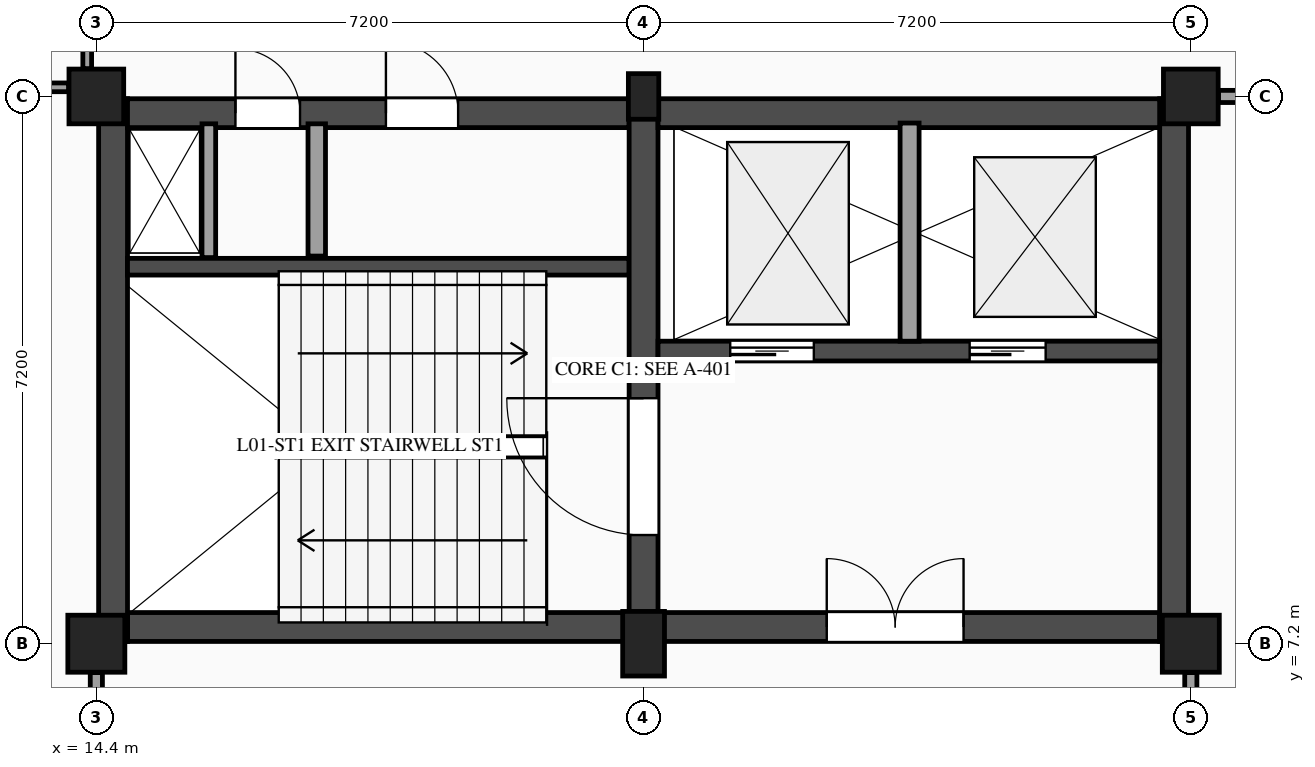
"""IFC4 building model, lengths in metres.
Left out: names, types, materials, properties, quantities, classifications, styles, units other than length and angle.
Written with IfcOpenShell. Run it as: python <this file> out.ifc"""

import sys

from ifc_helpers import new_model, si_unit, direction, frame, frame_2d, origin, origin_2d, place, context, subcontext, project, spatial, rectangle, extrude, element, fill, save


model = new_model("IFC4")
c1 = context("Model", 3, precision=1e-05, world=origin(), true_north=direction((0.0, 1.0)))
c2 = subcontext(c1, "Body", "Model", "MODEL_VIEW")
j1 = project(units=[si_unit("LENGTHUNIT", "METRE"), si_unit("PLANEANGLEUNIT", "RADIAN")], contexts=[c1])
p1 = place(None, origin())
s1 = spatial("IfcSite", under=j1, at=p1, CompositionType="ELEMENT")
p2 = place(p1, origin())
s2 = spatial("IfcBuilding", under=s1, at=p2, CompositionType="ELEMENT")
p3 = place(p2, frame((0.0, 0.0, 5.4)))
s3 = spatial("IfcBuildingStorey", under=s2, at=p3, CompositionType="ELEMENT", Elevation=5.4)
p4 = place(p3, frame((14.4, 7.2, 0.0), z_axis=(0.0, 0.0, 1.0), x_axis=(1.0, 0.0, 0.0)))
e1 = element("IfcColumn", 1, at=p4, inside=s3, PredefinedType="COLUMN", context=c2, shape_type="SweptSolid", body=[
    extrude(rectangle(XDim=0.75, YDim=0.75, at=origin_2d()), origin(), (0.0, 0.0, 1.0), 4.5),
])
p5 = place(p3, frame((14.4, 14.4, 0.0), z_axis=(0.0, 0.0, 1.0), x_axis=(1.0, 0.0, 0.0)))
e2 = element("IfcColumn", 2, at=p5, inside=s3, PredefinedType="COLUMN", context=c2, shape_type="SweptSolid", body=[
    extrude(rectangle(XDim=0.72, YDim=0.72, at=origin_2d()), origin(), (0.0, 0.0, 1.0), 4.5),
])
p6 = place(p3, frame((21.6, 7.2, 0.0), z_axis=(0.0, 0.0, 1.0), x_axis=(1.0, 0.0, 0.0)))
e3 = element("IfcColumn", 3, at=p6, inside=s3, PredefinedType="COLUMN", context=c2, shape_type="SweptSolid", body=[
    extrude(rectangle(XDim=0.55, YDim=0.85, at=origin_2d()), origin(), (0.0, 0.0, 1.0), 4.5),
])
p7 = place(p3, frame((21.6, 14.4, 0.0), z_axis=(0.0, 0.0, 1.0), x_axis=(1.0, 0.0, 0.0)))
e4 = element("IfcColumn", 4, at=p7, inside=s3, PredefinedType="PILASTER", context=c2, shape_type="SweptSolid", body=[
    extrude(rectangle(XDim=0.4, YDim=0.6, at=origin_2d()), origin(), (0.0, 0.0, 1.0), 4.5),
])
p8 = place(p3, frame((28.8, 7.2, 0.0), z_axis=(0.0, 0.0, 1.0), x_axis=(1.0, 0.0, 0.0)))
e5 = element("IfcColumn", 5, at=p8, inside=s3, PredefinedType="COLUMN", context=c2, shape_type="SweptSolid", body=[
    extrude(rectangle(XDim=0.75, YDim=0.75, at=origin_2d()), origin(), (0.0, 0.0, 1.0), 4.5),
])
p9 = place(p3, frame((28.8, 14.4, 0.0), z_axis=(0.0, 0.0, 1.0), x_axis=(1.0, 0.0, 0.0)))
e6 = element("IfcColumn", 6, at=p9, inside=s3, PredefinedType="COLUMN", context=c2, shape_type="SweptSolid", body=[
    extrude(rectangle(XDim=0.72, YDim=0.72, at=origin_2d()), origin(), (0.0, 0.0, 1.0), 4.5),
])
p10 = place(p3, frame((14.81, 7.42, 0.0), z_axis=(0.0, 0.0, 1.0), x_axis=(1.0, 0.0, 0.0)))
e7 = element("IfcWall", 7, at=p10, inside=s3, PredefinedType="SHEAR", context=c2, shape_type="SweptSolid", body=[
    extrude(rectangle(XDim=6.6, YDim=0.38, at=frame_2d((3.3, 0.0))), origin(), (0.0, 0.0, 1.0), 4.21),
])
p11 = place(p3, frame((14.62, 14.37, 0.0), z_axis=(0.0, 0.0, 1.0), x_axis=(0.0, -1.0, 0.0)))
e8 = element("IfcWall", 8, at=p11, inside=s3, PredefinedType="SHEAR", context=c2, shape_type="SweptSolid", body=[
    extrude(rectangle(XDim=7.14, YDim=0.38, at=frame_2d((3.57, 0.0))), origin(), (0.0, 0.0, 1.0), 4.21),
])
p12 = place(p3, frame((14.81, 14.18, 0.0), z_axis=(0.0, 0.0, 1.0), x_axis=(1.0, 0.0, 0.0)))
e9 = element("IfcWall", 9, at=p12, inside=s3, PredefinedType="SHEAR", context=c2, shape_type="SweptSolid", body=[
    extrude(rectangle(XDim=6.6, YDim=0.38, at=frame_2d((3.3, 0.0))), origin(), (0.0, 0.0, 1.0), 4.21),
])
p13 = place(p12, frame((1.42, 0.0, 0.0)))
e10 = element("IfcOpeningElement", 10, at=p13, cuts=e9, PredefinedType="OPENING", context=c2, shape_type="SweptSolid", body=[
    extrude(rectangle(XDim=0.85, YDim=2.1, at=frame_2d((0.425, 1.05))), frame((0.0, 0.2, 0.0), z_axis=(0.0, -1.0, 0.0), x_axis=(1.0, 0.0, 0.0)), (0.0, 0.0, 1.0), 0.4),
])
p14 = place(p12, frame((3.4, 0.0, 0.0)))
e11 = element("IfcOpeningElement", 11, at=p14, cuts=e9, PredefinedType="OPENING", context=c2, shape_type="SweptSolid", body=[
    extrude(rectangle(XDim=0.95, YDim=2.15, at=frame_2d((0.475, 1.075))), frame((0.0, 0.2, 0.0), z_axis=(0.0, -1.0, 0.0), x_axis=(1.0, 0.0, 0.0)), (0.0, 0.0, 1.0), 0.4),
])
p15 = place(p3, frame((14.81, 12.16, 0.0), z_axis=(0.0, 0.0, 1.0), x_axis=(1.0, 0.0, 0.0)))
e12 = element("IfcWall", 12, at=p15, inside=s3, PredefinedType="SHEAR", context=c2, shape_type="SweptSolid", body=[
    extrude(rectangle(XDim=6.6, YDim=0.22, at=frame_2d((3.3, 0.0))), origin(), (0.0, 0.0, 1.0), 4.21),
])
p16 = place(p3, frame((17.3, 12.3, 0.0), z_axis=(0.0, 0.0, 1.0), x_axis=(0.0, 1.0, 0.0)))
e13 = element("IfcWall", 13, at=p16, inside=s3, PredefinedType="PARTITIONING", context=c2, shape_type="SweptSolid", body=[
    extrude(rectangle(XDim=1.74, YDim=0.23, at=frame_2d((0.87, 0.0))), origin(), (0.0, 0.0, 1.0), 4.21),
])
p17 = place(p3, frame((15.88, 12.28, 0.0), z_axis=(0.0, 0.0, 1.0), x_axis=(0.0, 1.0, 0.0)))
e14 = element("IfcWall", 14, at=p17, inside=s3, PredefinedType="PARTITIONING", context=c2, shape_type="SweptSolid", body=[
    extrude(rectangle(XDim=1.76, YDim=0.18, at=frame_2d((0.88, 0.0))), origin(), (0.0, 0.0, 1.0), 4.21),
])
p18 = place(p3, frame((21.6, 7.23, 0.0), z_axis=(0.0, 0.0, 1.0), x_axis=(0.0, 1.0, 0.0)))
e15 = element("IfcWall", 15, at=p18, inside=s3, PredefinedType="SHEAR", context=c2, shape_type="SweptSolid", body=[
    extrude(rectangle(XDim=7.14, YDim=0.38, at=frame_2d((3.57, 0.0))), origin(), (0.0, 0.0, 1.0), 4.21),
])
p19 = place(p18, frame((1.4, 0.0, 0.0)))
e16 = element("IfcOpeningElement", 16, at=p19, cuts=e15, PredefinedType="OPENING", context=c2, shape_type="SweptSolid", body=[
    extrude(rectangle(XDim=1.8, YDim=2.2, at=frame_2d((0.9, 1.1))), frame((0.0, 0.2, 0.0), z_axis=(0.0, -1.0, 0.0), x_axis=(1.0, 0.0, 0.0)), (0.0, 0.0, 1.0), 0.4),
])
p20 = place(p3, frame((21.79, 7.42, 0.0), z_axis=(0.0, 0.0, 1.0), x_axis=(1.0, 0.0, 0.0)))
e17 = element("IfcWall", 17, at=p20, inside=s3, PredefinedType="SHEAR", context=c2, shape_type="SweptSolid", body=[
    extrude(rectangle(XDim=6.6, YDim=0.38, at=frame_2d((3.3, 0.0))), origin(), (0.0, 0.0, 1.0), 4.21),
])
p21 = place(p20, frame((2.22, 0.0, 0.0)))
e18 = element("IfcOpeningElement", 18, at=p21, cuts=e17, PredefinedType="OPENING", context=c2, shape_type="SweptSolid", body=[
    extrude(rectangle(XDim=1.8, YDim=2.2, at=frame_2d((0.9, 1.1))), frame((0.0, 0.2, 0.0), z_axis=(0.0, -1.0, 0.0), x_axis=(1.0, 0.0, 0.0)), (0.0, 0.0, 1.0), 0.4),
])
p22 = place(p3, frame((28.58, 7.23, 0.0), z_axis=(0.0, 0.0, 1.0), x_axis=(0.0, 1.0, 0.0)))
e19 = element("IfcWall", 19, at=p22, inside=s3, PredefinedType="SHEAR", context=c2, shape_type="SweptSolid", body=[
    extrude(rectangle(XDim=7.14, YDim=0.38, at=frame_2d((3.57, 0.0))), origin(), (0.0, 0.0, 1.0), 4.21),
])
p23 = place(p3, frame((21.79, 14.18, 0.0), z_axis=(0.0, 0.0, 1.0), x_axis=(1.0, 0.0, 0.0)))
e20 = element("IfcWall", 20, at=p23, inside=s3, PredefinedType="SHEAR", context=c2, shape_type="SweptSolid", body=[
    extrude(rectangle(XDim=6.6, YDim=0.38, at=frame_2d((3.3, 0.0))), origin(), (0.0, 0.0, 1.0), 4.21),
])
p24 = place(p3, frame((21.79, 11.05, 0.0), z_axis=(0.0, 0.0, 1.0), x_axis=(1.0, 0.0, 0.0)))
e21 = element("IfcWall", 21, at=p24, inside=s3, PredefinedType="SHEAR", context=c2, shape_type="SweptSolid", body=[
    extrude(rectangle(XDim=6.6, YDim=0.26, at=frame_2d((3.3, 0.0))), origin(), (0.0, 0.0, 1.0), 4.21),
])
p25 = place(p24, frame((0.95, 0.0, 0.0)))
e22 = element("IfcOpeningElement", 22, at=p25, cuts=e21, PredefinedType="OPENING", context=c2, shape_type="SweptSolid", body=[
    extrude(rectangle(XDim=1.1, YDim=2.2, at=frame_2d((0.55, 1.1))), frame((0.0, 0.14, 0.0), z_axis=(0.0, -1.0, 0.0), x_axis=(1.0, 0.0, 0.0)), (0.0, 0.0, 1.0), 0.28),
])
p26 = place(p24, frame((4.1, 0.0, 0.0)))
e23 = element("IfcOpeningElement", 23, at=p26, cuts=e21, PredefinedType="OPENING", context=c2, shape_type="SweptSolid", body=[
    extrude(rectangle(XDim=1.0, YDim=2.15, at=frame_2d((0.5, 1.075))), frame((0.0, 0.14, 0.0), z_axis=(0.0, -1.0, 0.0), x_axis=(1.0, 0.0, 0.0)), (0.0, 0.0, 1.0), 0.28),
])
p27 = place(p3, frame((25.1, 11.18, 0.0), z_axis=(0.0, 0.0, 1.0), x_axis=(0.0, 1.0, 0.0)))
e24 = element("IfcWall", 24, at=p27, inside=s3, PredefinedType="PARTITIONING", context=c2, shape_type="SweptSolid", body=[
    extrude(rectangle(XDim=2.87, YDim=0.25, at=frame_2d((1.435, 0.0))), origin(), (0.0, 0.0, 1.0), 4.21),
])
p28 = place(p3, frame((7.405, 14.52, 0.0), z_axis=(0.0, 0.0, 1.0), x_axis=(1.0, 0.0, 0.0)))
e25 = element("IfcWall", 25, at=p28, inside=s3, PredefinedType="PARTITIONING", context=c2, shape_type="SweptSolid", body=[
    extrude(rectangle(XDim=6.63, YDim=0.115, at=frame_2d((3.315, 0.0))), origin(), (0.0, 0.0, 1.0), 3.47),
])
p29 = place(p3, frame((14.28, 14.765, 0.0), z_axis=(0.0, 0.0, 1.0), x_axis=(0.0, 1.0, 0.0)))
e26 = element("IfcWall", 26, at=p29, inside=s3, PredefinedType="PARTITIONING", context=c2, shape_type="SweptSolid", body=[
    extrude(rectangle(XDim=6.48, YDim=0.115, at=frame_2d((3.24, 0.0))), origin(), (0.0, 0.0, 1.0), 3.52),
])
p30 = place(p29, frame((0.635, 0.0, 0.0)))
e27 = element("IfcOpeningElement", 27, at=p30, cuts=e26, PredefinedType="OPENING", context=c2, shape_type="SweptSolid", body=[
    extrude(rectangle(XDim=0.95, YDim=2.1, at=frame_2d((0.475, 1.05))), frame((0.0, 0.067, 0.0), z_axis=(0.0, -1.0, 0.0), x_axis=(1.0, 0.0, 0.0)), (0.0, 0.0, 1.0), 0.135),
])
p31 = place(p29, frame((2.735, 0.0, 0.0)))
e28 = element("IfcOpeningElement", 28, at=p31, cuts=e26, PredefinedType="OPENING", context=c2, shape_type="SweptSolid", body=[
    extrude(rectangle(XDim=0.95, YDim=2.1, at=frame_2d((0.475, 1.05))), frame((0.0, 0.067, 0.0), z_axis=(0.0, -1.0, 0.0), x_axis=(1.0, 0.0, 0.0)), (0.0, 0.0, 1.0), 0.135),
])
p32 = place(p29, frame((4.885, 0.0, 0.0)))
e29 = element("IfcOpeningElement", 29, at=p32, cuts=e26, PredefinedType="OPENING", context=c2, shape_type="SweptSolid", body=[
    extrude(rectangle(XDim=1.0, YDim=2.15, at=frame_2d((0.5, 1.075))), frame((0.0, 0.067, 0.0), z_axis=(0.0, -1.0, 0.0), x_axis=(1.0, 0.0, 0.0)), (0.0, 0.0, 1.0), 0.135),
])
p33 = place(p3, frame((14.4, 0.395, 0.0), z_axis=(0.0, 0.0, 1.0), x_axis=(0.0, 1.0, 0.0)))
e30 = element("IfcWall", 30, at=p33, inside=s3, PredefinedType="PARTITIONING", context=c2, shape_type="SweptSolid", body=[
    extrude(rectangle(XDim=6.425, YDim=0.16, at=frame_2d((3.212, 0.0))), origin(), (0.0, 0.0, 1.0), 3.525),
])
p34 = place(p33, frame((2.472, 0.0, 0.0)))
e31 = element("IfcOpeningElement", 31, at=p34, cuts=e30, PredefinedType="OPENING", context=c2, shape_type="SweptSolid", body=[
    extrude(rectangle(XDim=1.48, YDim=2.28, at=frame_2d((0.74, 1.14))), frame((0.0, 0.09, 0.0), z_axis=(0.0, -1.0, 0.0), x_axis=(1.0, 0.0, 0.0)), (0.0, 0.0, 1.0), 0.18),
])
p35 = place(p3, frame((28.8, 0.395, 0.0), z_axis=(0.0, 0.0, 1.0), x_axis=(0.0, 1.0, 0.0)))
e32 = element("IfcWall", 32, at=p35, inside=s3, PredefinedType="PARTITIONING", context=c2, shape_type="SweptSolid", body=[
    extrude(rectangle(XDim=6.425, YDim=0.16, at=frame_2d((3.212, 0.0))), origin(), (0.0, 0.0, 1.0), 3.525),
])
p36 = place(p35, frame((2.573, 0.0, 0.0)))
e33 = element("IfcOpeningElement", 33, at=p36, cuts=e32, PredefinedType="OPENING", context=c2, shape_type="SweptSolid", body=[
    extrude(rectangle(XDim=1.28, YDim=2.24, at=frame_2d((0.64, 1.12))), frame((0.0, 0.09, 0.0), z_axis=(0.0, -1.0, 0.0), x_axis=(1.0, 0.0, 0.0)), (0.0, 0.0, 1.0), 0.18),
])
p37 = place(p3, frame((29.165, 14.4, 0.0), z_axis=(0.0, 0.0, 1.0), x_axis=(1.0, 0.0, 0.0)))
e34 = element("IfcWall", 34, at=p37, inside=s3, PredefinedType="PARTITIONING", context=c2, shape_type="SweptSolid", body=[
    extrude(rectangle(XDim=6.63, YDim=0.16, at=frame_2d((3.315, 0.0))), origin(), (0.0, 0.0, 1.0), 3.51),
])
p38 = place(p13, origin())
e35 = element("IfcDoor", 35, at=p38, inside=s3, OperationType="SINGLE_SWING_LEFT", PredefinedType="DOOR", context=c2, shape_type="SweptSolid", body=[
    extrude(rectangle(XDim=0.85, YDim=2.1, at=frame_2d((0.425, 1.05))), frame((0.0, 0.025, 0.0), z_axis=(0.0, -1.0, 0.0), x_axis=(1.0, 0.0, 0.0)), (0.0, 0.0, 1.0), 0.05),
])
fill(e10, e35)
p39 = place(p19, origin())
e36 = element("IfcDoor", 36, at=p39, inside=s3, OperationType="SINGLE_SWING_RIGHT", PredefinedType="DOOR", context=c2, shape_type="SweptSolid", body=[
    extrude(rectangle(XDim=1.8, YDim=2.2, at=frame_2d((0.9, 1.1))), frame((0.0, 0.025, 0.0), z_axis=(0.0, -1.0, 0.0), x_axis=(1.0, 0.0, 0.0)), (0.0, 0.0, 1.0), 0.05),
])
fill(e16, e36)
p40 = place(p14, origin())
e37 = element("IfcDoor", 37, at=p40, inside=s3, OperationType="SINGLE_SWING_LEFT", PredefinedType="DOOR", context=c2, shape_type="SweptSolid", body=[
    extrude(rectangle(XDim=0.95, YDim=2.15, at=frame_2d((0.475, 1.075))), frame((0.0, 0.025, 0.0), z_axis=(0.0, -1.0, 0.0), x_axis=(1.0, 0.0, 0.0)), (0.0, 0.0, 1.0), 0.05),
])
fill(e11, e37)
p41 = place(p25, origin())
e38 = element("IfcDoor", 38, at=p41, inside=s3, OperationType="SLIDING_TO_LEFT", PredefinedType="DOOR", context=c2, shape_type="SweptSolid", body=[
    extrude(rectangle(XDim=1.1, YDim=2.2, at=frame_2d((0.55, 1.1))), frame((0.0, 0.025, 0.0), z_axis=(0.0, -1.0, 0.0), x_axis=(1.0, 0.0, 0.0)), (0.0, 0.0, 1.0), 0.05),
])
fill(e22, e38)
p42 = place(p26, origin())
e39 = element("IfcDoor", 39, at=p42, inside=s3, OperationType="SLIDING_TO_RIGHT", PredefinedType="DOOR", context=c2, shape_type="SweptSolid", body=[
    extrude(rectangle(XDim=1.0, YDim=2.15, at=frame_2d((0.5, 1.075))), frame((0.0, 0.025, 0.0), z_axis=(0.0, -1.0, 0.0), x_axis=(1.0, 0.0, 0.0)), (0.0, 0.0, 1.0), 0.05),
])
fill(e23, e39)
p43 = place(p21, origin())
e40 = element("IfcDoor", 40, at=p43, inside=s3, OperationType="DOUBLE_DOOR_SINGLE_SWING", PredefinedType="DOOR", context=c2, shape_type="SweptSolid", body=[
    extrude(rectangle(XDim=1.8, YDim=2.2, at=frame_2d((0.9, 1.1))), frame((0.0, 0.025, 0.0), z_axis=(0.0, -1.0, 0.0), x_axis=(1.0, 0.0, 0.0)), (0.0, 0.0, 1.0), 0.05),
])
fill(e18, e40)
save(model, sys.argv[1])
